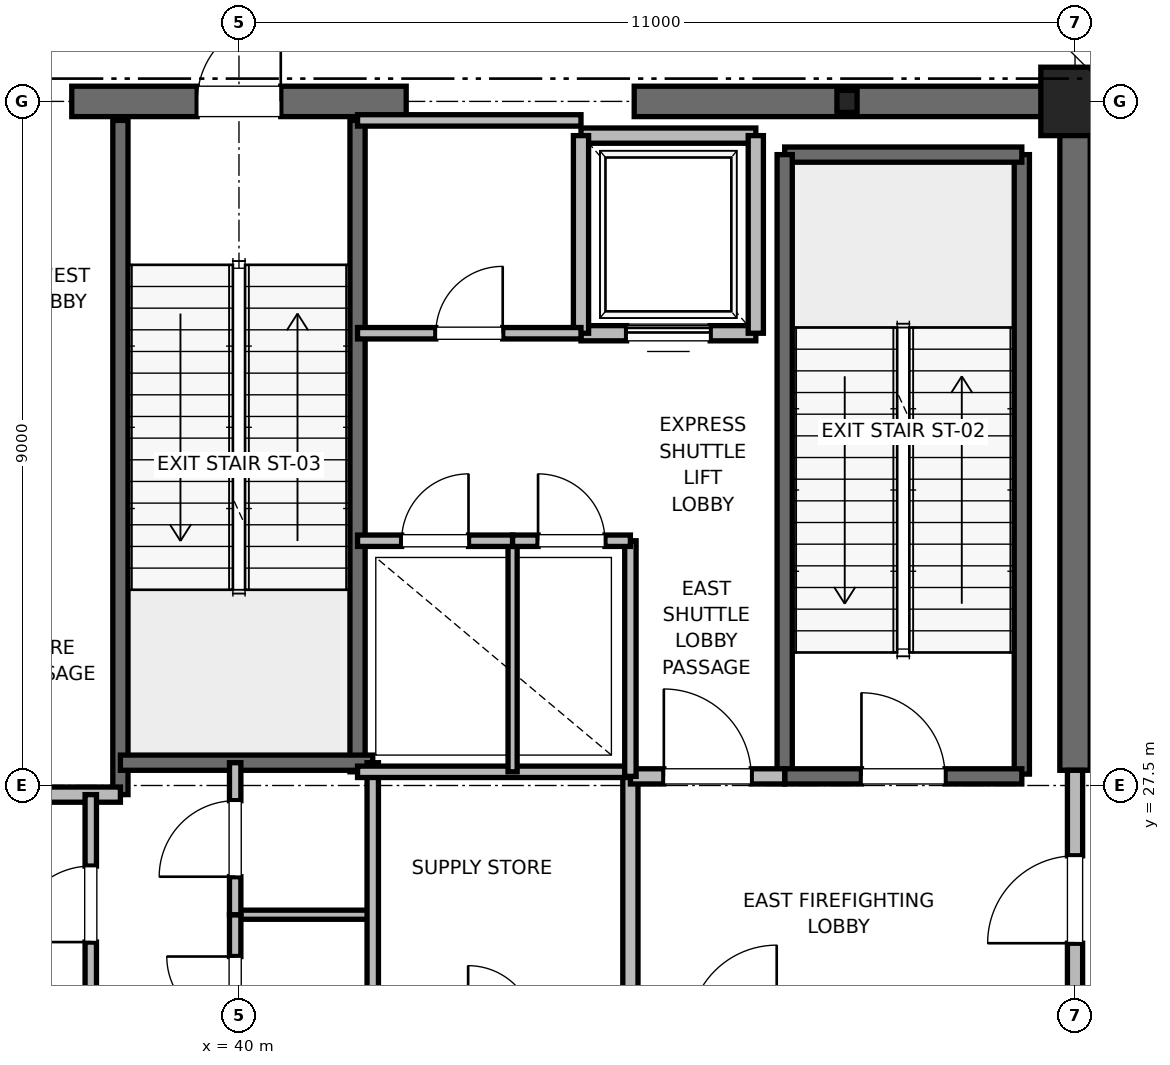
"""IFC4 building model, lengths in metres.
Left out: names, types, materials, properties, quantities, classifications, styles, units other than length and angle.
Written with IfcOpenShell. Run it as: python <this file> out.ifc"""

import sys

from ifc_helpers import new_model, si_unit, direction, frame, frame_2d, origin, origin_2d, place, context, subcontext, project, spatial, rectangle, i_section, extrude, element, fill, save


model = new_model("IFC4")
c1 = context("Model", 3, precision=1e-05, world=origin(), true_north=direction((0.0, 1.0)))
c2 = subcontext(c1, "Body", "Model", "MODEL_VIEW")
j1 = project(units=[si_unit("LENGTHUNIT", "METRE"), si_unit("PLANEANGLEUNIT", "RADIAN")], contexts=[c1])
p1 = place(None, origin())
s1 = spatial("IfcSite", under=j1, at=p1, CompositionType="ELEMENT")
p2 = place(p1, origin())
s2 = spatial("IfcBuilding", under=s1, at=p2, CompositionType="ELEMENT")
p3 = place(p2, frame((0.0, 0.0, 348.8)))
s3 = spatial("IfcBuildingStorey", under=s2, at=p3, CompositionType="ELEMENT", Elevation=348.8)
p4 = place(p3, frame((51.0, 36.5, 0.0), z_axis=(0.0, 0.0, 1.0), x_axis=(1.0, 0.0, 0.0)))
e1 = element("IfcColumn", 1, at=p4, inside=s3, PredefinedType="PILASTER", context=c2, shape_type="SweptSolid", body=[
    extrude(rectangle(XDim=0.9, YDim=0.9, at=origin_2d()), origin(), (0.0, 0.0, 1.0), 5.5),
])
p5 = place(p3, frame((48.0, 36.5, 0.0), z_axis=(0.0, 0.0, 1.0), x_axis=(1.0, 0.0, 0.0)))
e2 = element("IfcColumn", 2, at=p5, inside=s3, PredefinedType="COLUMN", context=c2, shape_type="SweptSolid", body=[
    extrude(i_section(OverallWidth=0.265, OverallDepth=0.289, WebThickness=0.019, FlangeThickness=0.032, FilletRadius=0.013, at=origin_2d()), origin(), (0.0, 0.0, 1.0), 5.5),
])
p6 = place(p3, frame((37.8, 36.5, 0.0), z_axis=(0.0, 0.0, 1.0), x_axis=(1.0, 0.0, 0.0)))
e3 = element("IfcWall", 3, at=p6, inside=s3, PredefinedType="SHEAR", context=c2, shape_type="SweptSolid", body=[
    extrude(rectangle(XDim=4.4, YDim=0.4, at=frame_2d((2.2, 0.0))), origin(), (0.0, 0.0, 1.0), 5.2),
])
p7 = place(p6, frame((1.65, 0.0, 0.0)))
e4 = element("IfcOpeningElement", 4, at=p7, cuts=e3, PredefinedType="OPENING", context=c2, shape_type="SweptSolid", body=[
    extrude(rectangle(XDim=1.1, YDim=2.15, at=frame_2d((0.55, 1.075))), frame((0.0, 0.2, 0.0), z_axis=(0.0, -1.0, 0.0), x_axis=(1.0, 0.0, 0.0)), (0.0, 0.0, 1.0), 0.4),
])
p8 = place(p3, frame((45.2, 36.5, 0.0), z_axis=(0.0, 0.0, 1.0), x_axis=(1.0, 0.0, 0.0)))
e5 = element("IfcWall", 5, at=p8, inside=s3, PredefinedType="SHEAR", context=c2, shape_type="SweptSolid", body=[
    extrude(rectangle(XDim=5.8, YDim=0.4, at=frame_2d((2.9, 0.0))), origin(), (0.0, 0.0, 1.0), 5.2),
])
p9 = place(p3, frame((51.0, 27.7, 0.0), z_axis=(0.0, 0.0, 1.0), x_axis=(0.0, 1.0, 0.0)))
e6 = element("IfcWall", 6, at=p9, inside=s3, PredefinedType="SHEAR", context=c2, shape_type="SweptSolid", body=[
    extrude(rectangle(XDim=8.8, YDim=0.4, at=frame_2d((4.4, 0.0))), origin(), (0.0, 0.0, 1.0), 5.2),
])
p10 = place(p3, frame((50.3, 27.65, 0.0), z_axis=(0.0, 0.0, 1.0), x_axis=(0.0, 1.0, 0.0)))
e7 = element("IfcWall", 7, at=p10, inside=s3, PredefinedType="SOLIDWALL", context=c2, shape_type="SweptSolid", body=[
    extrude(rectangle(XDim=8.15, YDim=0.2, at=frame_2d((4.075, 0.0))), origin(), (0.0, 0.0, 1.0), 5.2),
])
p11 = place(p3, frame((47.18, 35.8, 0.0), z_axis=(0.0, 0.0, 1.0), x_axis=(1.0, 0.0, 0.0)))
e8 = element("IfcWall", 8, at=p11, inside=s3, PredefinedType="SOLIDWALL", context=c2, shape_type="SweptSolid", body=[
    extrude(rectangle(XDim=3.12, YDim=0.2, at=frame_2d((1.56, 0.0))), origin(), (0.0, 0.0, 1.0), 5.2),
])
p12 = place(p3, frame((47.18, 27.62, 0.0), z_axis=(0.0, 0.0, 1.0), x_axis=(0.0, 1.0, 0.0)))
e9 = element("IfcWall", 9, at=p12, inside=s3, PredefinedType="SOLIDWALL", context=c2, shape_type="SweptSolid", body=[
    extrude(rectangle(XDim=8.18, YDim=0.2, at=frame_2d((4.09, 0.0))), origin(), (0.0, 0.0, 1.0), 5.2),
])
p13 = place(p3, frame((47.18, 27.62, 0.0), z_axis=(0.0, 0.0, 1.0), x_axis=(1.0, 0.0, 0.0)))
e10 = element("IfcWall", 10, at=p13, inside=s3, PredefinedType="SOLIDWALL", context=c2, shape_type="SweptSolid", body=[
    extrude(rectangle(XDim=3.12, YDim=0.2, at=frame_2d((1.56, 0.0))), origin(), (0.0, 0.0, 1.0), 5.2),
])
p14 = place(p13, frame((1.01, 0.0, 0.0)))
e11 = element("IfcOpeningElement", 11, at=p14, cuts=e10, PredefinedType="OPENING", context=c2, shape_type="SweptSolid", body=[
    extrude(rectangle(XDim=1.1, YDim=2.15, at=frame_2d((0.55, 1.075))), frame((0.0, 0.1, 0.0), z_axis=(0.0, -1.0, 0.0), x_axis=(1.0, 0.0, 0.0)), (0.0, 0.0, 1.0), 0.2),
])
p15 = place(p3, frame((38.44, 27.38, 0.0), z_axis=(0.0, 0.0, 1.0), x_axis=(0.0, 1.0, 0.0)))
e12 = element("IfcWall", 12, at=p15, inside=s3, PredefinedType="SOLIDWALL", context=c2, shape_type="SweptSolid", body=[
    extrude(rectangle(XDim=8.87, YDim=0.2, at=frame_2d((4.435, 0.0))), origin(), (0.0, 0.0, 1.0), 5.2),
])
p16 = place(p3, frame((41.56, 27.68, 0.0), z_axis=(0.0, 0.0, 1.0), x_axis=(0.0, 1.0, 0.0)))
e13 = element("IfcWall", 13, at=p16, inside=s3, PredefinedType="SOLIDWALL", context=c2, shape_type="SweptSolid", body=[
    extrude(rectangle(XDim=8.57, YDim=0.2, at=frame_2d((4.285, 0.0))), origin(), (0.0, 0.0, 1.0), 5.2),
])
p17 = place(p3, frame((38.44, 27.8, 0.0), z_axis=(0.0, 0.0, 1.0), x_axis=(1.0, 0.0, 0.0)))
e14 = element("IfcWall", 14, at=p17, inside=s3, PredefinedType="SOLIDWALL", context=c2, shape_type="SweptSolid", body=[
    extrude(rectangle(XDim=3.32, YDim=0.2, at=frame_2d((1.66, 0.0))), origin(), (0.0, 0.0, 1.0), 5.2),
])
p18 = place(p3, frame((32.82, 27.38, 0.0), z_axis=(0.0, 0.0, 1.0), x_axis=(1.0, 0.0, 0.0)))
e15 = element("IfcWall", 15, at=p18, inside=s3, PredefinedType="PARTITIONING", context=c2, shape_type="SweptSolid", body=[
    extrude(rectangle(XDim=5.62, YDim=0.2, at=frame_2d((2.81, 0.0))), origin(), (0.0, 0.0, 1.0), 5.2),
])
p19 = place(p3, frame((45.15, 24.25, 0.0), z_axis=(0.0, 0.0, 1.0), x_axis=(0.0, 1.0, 0.0)))
e16 = element("IfcWall", 16, at=p19, inside=s3, PredefinedType="PARTITIONING", context=c2, shape_type="SweptSolid", body=[
    extrude(rectangle(XDim=3.37, YDim=0.2, at=frame_2d((1.685, 0.0))), origin(), (0.0, 0.0, 1.0), 5.2),
])
p20 = place(p3, frame((45.15, 27.62, 0.0), z_axis=(0.0, 0.0, 1.0), x_axis=(1.0, 0.0, 0.0)))
e17 = element("IfcWall", 17, at=p20, inside=s3, PredefinedType="PARTITIONING", context=c2, shape_type="SweptSolid", body=[
    extrude(rectangle(XDim=2.03, YDim=0.2, at=frame_2d((1.015, 0.0))), origin(), (0.0, 0.0, 1.0), 5.2),
])
p21 = place(p20, frame((0.44, 0.0, 0.0)))
e18 = element("IfcOpeningElement", 18, at=p21, cuts=e17, PredefinedType="OPENING", context=c2, shape_type="SweptSolid", body=[
    extrude(rectangle(XDim=1.15, YDim=2.2, at=frame_2d((0.575, 1.1))), frame((0.0, 0.1, 0.0), z_axis=(0.0, -1.0, 0.0), x_axis=(1.0, 0.0, 0.0)), (0.0, 0.0, 1.0), 0.2),
])
p22 = place(p3, frame((51.0, 24.3, 0.0), z_axis=(0.0, 0.0, 1.0), x_axis=(0.0, 1.0, 0.0)))
e19 = element("IfcWall", 19, at=p22, inside=s3, PredefinedType="PARTITIONING", context=c2, shape_type="SweptSolid", body=[
    extrude(rectangle(XDim=3.4, YDim=0.2, at=frame_2d((1.7, 0.0))), origin(), (0.0, 0.0, 1.0), 4.28),
])
p23 = place(p22, frame((1.125, 0.0, 0.0)))
e20 = element("IfcOpeningElement", 20, at=p23, cuts=e19, PredefinedType="OPENING", context=c2, shape_type="SweptSolid", body=[
    extrude(rectangle(XDim=1.15, YDim=2.2, at=frame_2d((0.575, 1.1))), frame((0.0, 0.1, 0.0), z_axis=(0.0, -1.0, 0.0), x_axis=(1.0, 0.0, 0.0)), (0.0, 0.0, 1.0), 0.2),
])
p24 = place(p3, frame((44.5, 33.45, 0.0), z_axis=(0.0, 0.0, 1.0), x_axis=(1.0, 0.0, 0.0)))
e21 = element("IfcWall", 21, at=p24, inside=s3, PredefinedType="SOLIDWALL", context=c2, shape_type="SweptSolid", body=[
    extrude(rectangle(XDim=2.3, YDim=0.2, at=frame_2d((1.15, 0.0))), origin(), (0.0, 0.0, 1.0), 5.2),
])
p25 = place(p24, frame((0.6, 0.0, 0.0)))
e22 = element("IfcOpeningElement", 22, at=p25, cuts=e21, PredefinedType="OPENING", context=c2, shape_type="SweptSolid", body=[
    extrude(rectangle(XDim=1.1, YDim=2.2, at=frame_2d((0.55, 1.1))), frame((0.0, 0.1, 0.0), z_axis=(0.0, -1.0, 0.0), x_axis=(1.0, 0.0, 0.0)), (0.0, 0.0, 1.0), 0.2),
])
p26 = place(p3, frame((46.8, 36.05, 0.0), z_axis=(0.0, 0.0, 1.0), x_axis=(-1.0, 0.0, 0.0)))
e23 = element("IfcWall", 23, at=p26, inside=s3, PredefinedType="SOLIDWALL", context=c2, shape_type="SweptSolid", body=[
    extrude(rectangle(XDim=2.3, YDim=0.2, at=frame_2d((1.15, 0.0))), origin(), (0.0, 0.0, 1.0), 4.28),
])
p27 = place(p3, frame((44.5, 36.05, 0.0), z_axis=(0.0, 0.0, 1.0), x_axis=(0.0, -1.0, 0.0)))
e24 = element("IfcWall", 24, at=p27, inside=s3, PredefinedType="SOLIDWALL", context=c2, shape_type="SweptSolid", body=[
    extrude(rectangle(XDim=2.6, YDim=0.2, at=frame_2d((1.3, 0.0))), origin(), (0.0, 0.0, 1.0), 4.28),
])
p28 = place(p3, frame((46.8, 33.45, 0.0), z_axis=(0.0, 0.0, 1.0), x_axis=(0.0, 1.0, 0.0)))
e25 = element("IfcWall", 25, at=p28, inside=s3, PredefinedType="SOLIDWALL", context=c2, shape_type="SweptSolid", body=[
    extrude(rectangle(XDim=2.6, YDim=0.2, at=frame_2d((1.3, 0.0))), origin(), (0.0, 0.0, 1.0), 5.2),
])
p29 = place(p3, frame((39.95, 25.8, 0.0), z_axis=(0.0, 0.0, 1.0), x_axis=(1.0, 0.0, 0.0)))
e26 = element("IfcWall", 26, at=p29, inside=s3, PredefinedType="PARTITIONING", context=c2, shape_type="SweptSolid", body=[
    extrude(rectangle(XDim=1.81, YDim=0.12, at=frame_2d((0.905, 0.0))), origin(), (0.0, 0.0, 1.0), 2.85),
])
p30 = place(p3, frame((41.76, 23.8, 0.0), z_axis=(0.0, 0.0, 1.0), x_axis=(0.0, 1.0, 0.0)))
e27 = element("IfcWall", 27, at=p30, inside=s3, PredefinedType="PARTITIONING", context=c2, shape_type="SweptSolid", body=[
    extrude(rectangle(XDim=4.0, YDim=0.15, at=frame_2d((2.0, 0.0))), origin(), (0.0, 0.0, 1.0), 2.85),
])
p31 = place(p3, frame((39.95, 23.8, 0.0), z_axis=(0.0, 0.0, 1.0), x_axis=(0.0, 1.0, 0.0)))
e28 = element("IfcWall", 28, at=p31, inside=s3, PredefinedType="PARTITIONING", context=c2, shape_type="SweptSolid", body=[
    extrude(rectangle(XDim=2.0, YDim=0.15, at=frame_2d((1.0, 0.0))), origin(), (0.0, 0.0, 1.0), 2.85),
])
p32 = place(p31, frame((0.55, 0.0, 0.0)))
e29 = element("IfcOpeningElement", 29, at=p32, cuts=e28, PredefinedType="OPENING", context=c2, shape_type="SweptSolid", body=[
    extrude(rectangle(XDim=0.9, YDim=2.1, at=frame_2d((0.45, 1.05))), frame((0.0, 0.075, 0.0), z_axis=(0.0, -1.0, 0.0), x_axis=(1.0, 0.0, 0.0)), (0.0, 0.0, 1.0), 0.15),
])
p33 = place(p3, frame((39.95, 25.8, 0.0), z_axis=(0.0, 0.0, 1.0), x_axis=(0.0, 1.0, 0.0)))
e30 = element("IfcWall", 30, at=p33, inside=s3, PredefinedType="PARTITIONING", context=c2, shape_type="SweptSolid", body=[
    extrude(rectangle(XDim=2.0, YDim=0.15, at=frame_2d((1.0, 0.0))), origin(), (0.0, 0.0, 1.0), 2.85),
])
p34 = place(p33, frame((0.5, 0.0, 0.0)))
e31 = element("IfcOpeningElement", 31, at=p34, cuts=e30, PredefinedType="OPENING", context=c2, shape_type="SweptSolid", body=[
    extrude(rectangle(XDim=1.0, YDim=2.15, at=frame_2d((0.5, 1.075))), frame((0.0, 0.075, 0.0), z_axis=(0.0, -1.0, 0.0), x_axis=(1.0, 0.0, 0.0)), (0.0, 0.0, 1.0), 0.15),
])
p35 = place(p3, frame((38.05, 24.5, 0.0), z_axis=(0.0, 0.0, 1.0), x_axis=(0.0, 1.0, 0.0)))
e32 = element("IfcWall", 32, at=p35, inside=s3, PredefinedType="PARTITIONING", context=c2, shape_type="SweptSolid", body=[
    extrude(rectangle(XDim=2.88, YDim=0.15, at=frame_2d((1.44, 0.0))), origin(), (0.0, 0.0, 1.0), 2.85),
])
p36 = place(p35, frame((0.94, 0.0, 0.0)))
e33 = element("IfcOpeningElement", 33, at=p36, cuts=e32, PredefinedType="OPENING", context=c2, shape_type="SweptSolid", body=[
    extrude(rectangle(XDim=1.0, YDim=2.15, at=frame_2d((0.5, 1.075))), frame((0.0, 0.075, 0.0), z_axis=(0.0, -1.0, 0.0), x_axis=(1.0, 0.0, 0.0)), (0.0, 0.0, 1.0), 0.15),
])
p37 = place(p3, frame((41.56, 27.68, 0.0), z_axis=(0.0, 0.0, 1.0), x_axis=(1.0, 0.0, 0.0)))
e34 = element("IfcWall", 34, at=p37, inside=s3, PredefinedType="PARTITIONING", context=c2, shape_type="SweptSolid", body=[
    extrude(rectangle(XDim=3.59, YDim=0.15, at=frame_2d((1.795, 0.0))), origin(), (0.0, 0.0, 1.0), 2.85),
])
p38 = place(p3, frame((45.15, 27.62, 0.0), z_axis=(0.0, 0.0, 1.0), x_axis=(0.0, 1.0, 0.0)))
e35 = element("IfcWall", 35, at=p38, inside=s3, PredefinedType="PARTITIONING", context=c2, shape_type="SweptSolid", body=[
    extrude(rectangle(XDim=3.1, YDim=0.15, at=frame_2d((1.55, 0.0))), origin(), (0.0, 0.0, 1.0), 2.85),
])
p39 = place(p3, frame((43.6, 27.68, 0.0), z_axis=(0.0, 0.0, 1.0), x_axis=(0.0, 1.0, 0.0)))
e36 = element("IfcWall", 36, at=p39, inside=s3, PredefinedType="PARTITIONING", context=c2, shape_type="SweptSolid", body=[
    extrude(rectangle(XDim=3.04, YDim=0.12, at=frame_2d((1.52, 0.0))), origin(), (0.0, 0.0, 1.0), 2.85),
])
p40 = place(p3, frame((41.56, 30.72, 0.0), z_axis=(0.0, 0.0, 1.0), x_axis=(1.0, 0.0, 0.0)))
e37 = element("IfcWall", 37, at=p40, inside=s3, PredefinedType="PARTITIONING", context=c2, shape_type="SweptSolid", body=[
    extrude(rectangle(XDim=2.04, YDim=0.15, at=frame_2d((1.02, 0.0))), origin(), (0.0, 0.0, 1.0), 2.85),
])
p41 = place(p40, frame((0.58, 0.0, 0.0)))
e38 = element("IfcOpeningElement", 38, at=p41, cuts=e37, PredefinedType="OPENING", context=c2, shape_type="SweptSolid", body=[
    extrude(rectangle(XDim=0.88, YDim=2.1, at=frame_2d((0.44, 1.05))), frame((0.0, 0.075, 0.0), z_axis=(0.0, -1.0, 0.0), x_axis=(1.0, 0.0, 0.0)), (0.0, 0.0, 1.0), 0.15),
])
p42 = place(p3, frame((43.6, 30.72, 0.0), z_axis=(0.0, 0.0, 1.0), x_axis=(1.0, 0.0, 0.0)))
e39 = element("IfcWall", 39, at=p42, inside=s3, PredefinedType="PARTITIONING", context=c2, shape_type="SweptSolid", body=[
    extrude(rectangle(XDim=1.55, YDim=0.15, at=frame_2d((0.775, 0.0))), origin(), (0.0, 0.0, 1.0), 2.85),
])
p43 = place(p42, frame((0.335, 0.0, 0.0)))
e40 = element("IfcOpeningElement", 40, at=p43, cuts=e39, PredefinedType="OPENING", context=c2, shape_type="SweptSolid", body=[
    extrude(rectangle(XDim=0.88, YDim=2.1, at=frame_2d((0.44, 1.05))), frame((0.0, 0.075, 0.0), z_axis=(0.0, -1.0, 0.0), x_axis=(1.0, 0.0, 0.0)), (0.0, 0.0, 1.0), 0.15),
])
p44 = place(p3, frame((41.56, 36.25, 0.0), z_axis=(0.0, 0.0, 1.0), x_axis=(1.0, 0.0, 0.0)))
e41 = element("IfcWall", 41, at=p44, inside=s3, PredefinedType="PARTITIONING", context=c2, shape_type="SweptSolid", body=[
    extrude(rectangle(XDim=2.94, YDim=0.15, at=frame_2d((1.47, 0.0))), origin(), (0.0, 0.0, 1.0), 2.85),
])
p45 = place(p3, frame((41.56, 33.45, 0.0), z_axis=(0.0, 0.0, 1.0), x_axis=(1.0, 0.0, 0.0)))
e42 = element("IfcWall", 42, at=p45, inside=s3, PredefinedType="PARTITIONING", context=c2, shape_type="SweptSolid", body=[
    extrude(rectangle(XDim=2.94, YDim=0.15, at=frame_2d((1.47, 0.0))), origin(), (0.0, 0.0, 1.0), 2.85),
])
p46 = place(p45, frame((1.03, 0.0, 0.0)))
e43 = element("IfcOpeningElement", 43, at=p46, cuts=e42, PredefinedType="OPENING", context=c2, shape_type="SweptSolid", body=[
    extrude(rectangle(XDim=0.88, YDim=2.1, at=frame_2d((0.44, 1.05))), frame((0.0, 0.075, 0.0), z_axis=(0.0, -1.0, 0.0), x_axis=(1.0, 0.0, 0.0)), (0.0, 0.0, 1.0), 0.15),
])
p47 = place(p14, origin())
e44 = element("IfcDoor", 44, at=p47, inside=s3, OperationType="SINGLE_SWING_LEFT", PredefinedType="DOOR", context=c2, shape_type="SweptSolid", body=[
    extrude(rectangle(XDim=1.1, YDim=2.15, at=frame_2d((0.55, 1.075))), frame((0.0, 0.025, 0.0), z_axis=(0.0, -1.0, 0.0), x_axis=(1.0, 0.0, 0.0)), (0.0, 0.0, 1.0), 0.05),
])
fill(e11, e44)
p48 = place(p7, origin())
e45 = element("IfcDoor", 45, at=p48, inside=s3, OperationType="SINGLE_SWING_RIGHT", PredefinedType="DOOR", context=c2, shape_type="SweptSolid", body=[
    extrude(rectangle(XDim=1.1, YDim=2.15, at=frame_2d((0.55, 1.075))), frame((0.0, 0.025, 0.0), z_axis=(0.0, -1.0, 0.0), x_axis=(1.0, 0.0, 0.0)), (0.0, 0.0, 1.0), 0.05),
])
fill(e4, e45)
p49 = place(p21, origin())
e46 = element("IfcDoor", 46, at=p49, inside=s3, OperationType="SINGLE_SWING_LEFT", PredefinedType="DOOR", context=c2, shape_type="SweptSolid", body=[
    extrude(rectangle(XDim=1.15, YDim=2.2, at=frame_2d((0.575, 1.1))), frame((0.0, 0.025, 0.0), z_axis=(0.0, -1.0, 0.0), x_axis=(1.0, 0.0, 0.0)), (0.0, 0.0, 1.0), 0.05),
])
fill(e18, e46)
p50 = place(p23, origin())
e47 = element("IfcDoor", 47, at=p50, inside=s3, OperationType="SINGLE_SWING_LEFT", PredefinedType="DOOR", context=c2, shape_type="SweptSolid", body=[
    extrude(rectangle(XDim=1.15, YDim=2.2, at=frame_2d((0.575, 1.1))), frame((0.0, 0.025, 0.0), z_axis=(0.0, -1.0, 0.0), x_axis=(1.0, 0.0, 0.0)), (0.0, 0.0, 1.0), 0.05),
])
fill(e20, e47)
p51 = place(p25, origin())
e48 = element("IfcDoor", 48, at=p51, inside=s3, OperationType="SLIDING_TO_RIGHT", PredefinedType="DOOR", context=c2, shape_type="SweptSolid", body=[
    extrude(rectangle(XDim=1.1, YDim=2.2, at=frame_2d((0.55, 1.1))), frame((0.0, 0.025, 0.0), z_axis=(0.0, -1.0, 0.0), x_axis=(1.0, 0.0, 0.0)), (0.0, 0.0, 1.0), 0.05),
])
fill(e22, e48)
p52 = place(p32, origin())
e49 = element("IfcDoor", 49, at=p52, inside=s3, OperationType="SINGLE_SWING_RIGHT", PredefinedType="DOOR", context=c2, shape_type="SweptSolid", body=[
    extrude(rectangle(XDim=0.9, YDim=2.1, at=frame_2d((0.45, 1.05))), frame((0.0, 0.025, 0.0), z_axis=(0.0, -1.0, 0.0), x_axis=(1.0, 0.0, 0.0)), (0.0, 0.0, 1.0), 0.05),
])
fill(e29, e49)
p53 = place(p34, origin())
e50 = element("IfcDoor", 50, at=p53, inside=s3, OperationType="SINGLE_SWING_LEFT", PredefinedType="DOOR", context=c2, shape_type="SweptSolid", body=[
    extrude(rectangle(XDim=1.0, YDim=2.15, at=frame_2d((0.5, 1.075))), frame((0.0, 0.025, 0.0), z_axis=(0.0, -1.0, 0.0), x_axis=(1.0, 0.0, 0.0)), (0.0, 0.0, 1.0), 0.05),
])
fill(e31, e50)
p54 = place(p36, origin())
e51 = element("IfcDoor", 51, at=p54, inside=s3, OperationType="SINGLE_SWING_LEFT", PredefinedType="DOOR", context=c2, shape_type="SweptSolid", body=[
    extrude(rectangle(XDim=1.0, YDim=2.15, at=frame_2d((0.5, 1.075))), frame((0.0, 0.025, 0.0), z_axis=(0.0, -1.0, 0.0), x_axis=(1.0, 0.0, 0.0)), (0.0, 0.0, 1.0), 0.05),
])
fill(e33, e51)
p55 = place(p41, origin())
e52 = element("IfcDoor", 52, at=p55, inside=s3, OperationType="SINGLE_SWING_RIGHT", PredefinedType="DOOR", context=c2, shape_type="SweptSolid", body=[
    extrude(rectangle(XDim=0.88, YDim=2.1, at=frame_2d((0.44, 1.05))), frame((0.0, 0.025, 0.0), z_axis=(0.0, -1.0, 0.0), x_axis=(1.0, 0.0, 0.0)), (0.0, 0.0, 1.0), 0.05),
])
fill(e38, e52)
p56 = place(p43, origin())
e53 = element("IfcDoor", 53, at=p56, inside=s3, OperationType="SINGLE_SWING_LEFT", PredefinedType="DOOR", context=c2, shape_type="SweptSolid", body=[
    extrude(rectangle(XDim=0.88, YDim=2.1, at=frame_2d((0.44, 1.05))), frame((0.0, 0.025, 0.0), z_axis=(0.0, -1.0, 0.0), x_axis=(1.0, 0.0, 0.0)), (0.0, 0.0, 1.0), 0.05),
])
fill(e40, e53)
p57 = place(p46, origin())
e54 = element("IfcDoor", 54, at=p57, inside=s3, OperationType="SINGLE_SWING_RIGHT", PredefinedType="DOOR", context=c2, shape_type="SweptSolid", body=[
    extrude(rectangle(XDim=0.88, YDim=2.1, at=frame_2d((0.44, 1.05))), frame((0.0, 0.025, 0.0), z_axis=(0.0, -1.0, 0.0), x_axis=(1.0, 0.0, 0.0)), (0.0, 0.0, 1.0), 0.05),
])
fill(e43, e54)
save(model, sys.argv[1])
